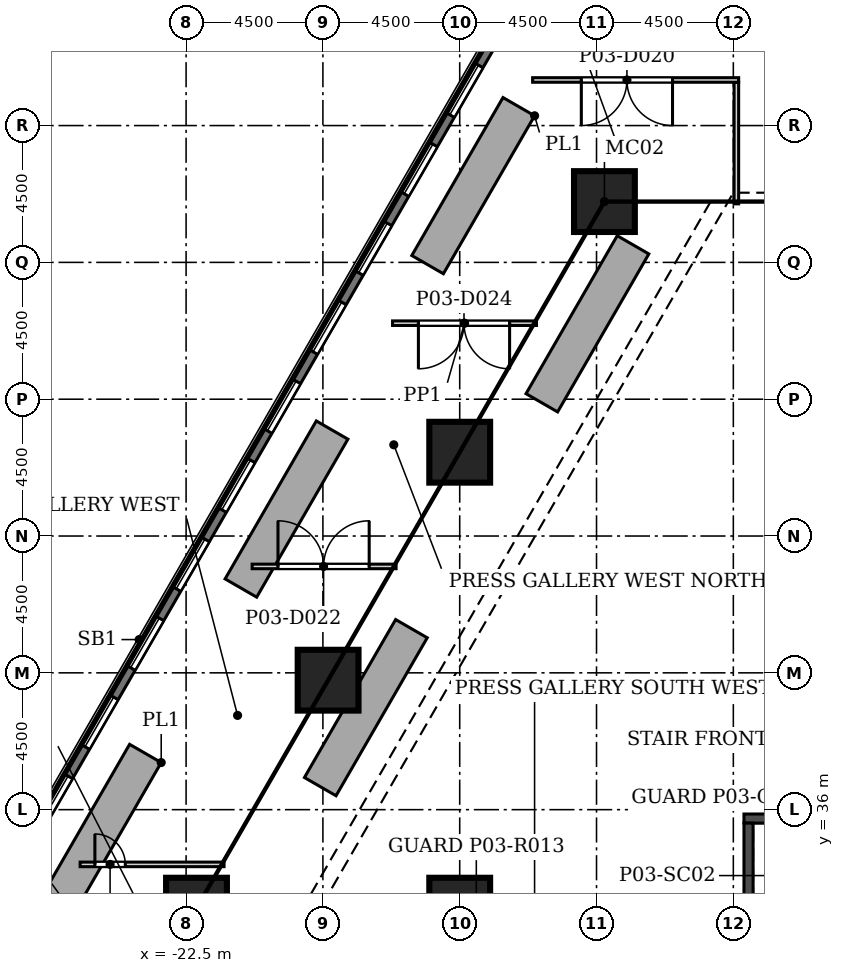
"""IFC4 building model, lengths in metres.
Left out: names, types, materials, properties, quantities, classifications, styles, units other than length and angle.
Written with IfcOpenShell. Run it as: python <this file> out.ifc"""

import sys

from ifc_helpers import new_model, si_unit, direction, frame, frame_2d, origin, origin_2d, place, context, subcontext, project, spatial, polyline, rectangle, outline, extrude, element, fill, save


model = new_model("IFC4")
c1 = context("Model", 3, precision=1e-05, world=origin(), true_north=direction((0.0, 1.0)))
c2 = subcontext(c1, "Body", "Model", "MODEL_VIEW")
j1 = project(units=[si_unit("LENGTHUNIT", "METRE"), si_unit("PLANEANGLEUNIT", "RADIAN")], contexts=[c1])
p1 = place(None, origin())
s1 = spatial("IfcSite", under=j1, at=p1, CompositionType="ELEMENT")
p2 = place(p1, origin())
s2 = spatial("IfcBuilding", under=s1, at=p2, CompositionType="ELEMENT")
p3 = place(p2, frame((0.0, 0.0, 20.0)))
s3 = spatial("IfcBuildingStorey", under=s2, at=p3, CompositionType="ELEMENT", Elevation=20.0)
for number, where, z_axis, x_axis in (
    (1, (-8.74, 56.0, 0.0), (0.0, 0.0, 1.0), (1.0, 0.0, 0.0)),
    (2, (-22.158, 32.76, 0.0), (0.0, 0.0, 1.0), (1.0, 0.0, 0.0)),
    (3, (-13.5, 47.756, 0.0), (0.0, 0.0, 1.0), (1.0, 0.0, 0.0)),
    (4, (-13.5, 32.76, 0.0), (0.0, 0.0, 1.0), (1.0, 0.0, 0.0)),
    (5, (-17.829, 40.258, 0.0), (0.0, 0.0, 1.0), (1.0, 0.0, 0.0)),
):
    element("IfcColumn", number, at=place(p3, frame(where, z_axis=z_axis, x_axis=x_axis)), inside=s3, PredefinedType="COLUMN", context=c2, shape_type="SweptSolid", body=[
        extrude(rectangle(XDim=2.0, YDim=2.0, at=origin_2d()), origin(), (0.0, 0.0, 1.0), 5.0),
    ])
p4 = place(p3, frame((-4.853, 74.393, 0.0), z_axis=(0.0, 0.0, 1.0), x_axis=(-0.49999894854, -0.866026010844, 0.0)))
e6 = element("IfcWall", 6, at=p4, inside=s3, PredefinedType="SOLIDWALL", context=c2, shape_type="SweptSolid", body=[
    extrude(rectangle(XDim=76.0, YDim=0.34, at=frame_2d((38.0, 0.0))), origin(), (0.0, 0.0, 1.0), 3.0),
])
p5 = place(p4, frame((1.058, 0.0, 0.9)))
e7 = element("IfcOpeningElement", 7, at=p5, cuts=e6, PredefinedType="OPENING", context=c2, shape_type="SweptSolid", body=[
    extrude(rectangle(XDim=1.885, YDim=1.9, at=frame_2d((0.942, 0.95))), frame((0.0, 0.18, 0.0), z_axis=(0.0, -1.0, 0.0), x_axis=(1.0, 0.0, 0.0)), (0.0, 0.0, 1.0), 0.36),
])
p6 = place(p4, frame((4.058, 0.0, 0.9)))
e8 = element("IfcOpeningElement", 8, at=p6, cuts=e6, PredefinedType="OPENING", context=c2, shape_type="SweptSolid", body=[
    extrude(rectangle(XDim=1.885, YDim=1.9, at=frame_2d((0.942, 0.95))), frame((0.0, 0.18, 0.0), z_axis=(0.0, -1.0, 0.0), x_axis=(1.0, 0.0, 0.0)), (0.0, 0.0, 1.0), 0.36),
])
p7 = place(p4, frame((7.058, 0.0, 0.9)))
e9 = element("IfcOpeningElement", 9, at=p7, cuts=e6, PredefinedType="OPENING", context=c2, shape_type="SweptSolid", body=[
    extrude(rectangle(XDim=1.885, YDim=1.9, at=frame_2d((0.942, 0.95))), frame((0.0, 0.18, 0.0), z_axis=(0.0, -1.0, 0.0), x_axis=(1.0, 0.0, 0.0)), (0.0, 0.0, 1.0), 0.36),
])
p8 = place(p4, frame((10.058, 0.0, 0.9)))
e10 = element("IfcOpeningElement", 10, at=p8, cuts=e6, PredefinedType="OPENING", context=c2, shape_type="SweptSolid", body=[
    extrude(rectangle(XDim=1.885, YDim=1.9, at=frame_2d((0.942, 0.95))), frame((0.0, 0.18, 0.0), z_axis=(0.0, -1.0, 0.0), x_axis=(1.0, 0.0, 0.0)), (0.0, 0.0, 1.0), 0.36),
])
p9 = place(p4, frame((13.058, 0.0, 0.9)))
e11 = element("IfcOpeningElement", 11, at=p9, cuts=e6, PredefinedType="OPENING", context=c2, shape_type="SweptSolid", body=[
    extrude(rectangle(XDim=1.885, YDim=1.9, at=frame_2d((0.942, 0.95))), frame((0.0, 0.18, 0.0), z_axis=(0.0, -1.0, 0.0), x_axis=(1.0, 0.0, 0.0)), (0.0, 0.0, 1.0), 0.36),
])
p10 = place(p4, frame((16.058, 0.0, 0.9)))
e12 = element("IfcOpeningElement", 12, at=p10, cuts=e6, PredefinedType="OPENING", context=c2, shape_type="SweptSolid", body=[
    extrude(rectangle(XDim=1.885, YDim=1.9, at=frame_2d((0.942, 0.95))), frame((0.0, 0.18, 0.0), z_axis=(0.0, -1.0, 0.0), x_axis=(1.0, 0.0, 0.0)), (0.0, 0.0, 1.0), 0.36),
])
p11 = place(p4, frame((19.058, 0.0, 0.9)))
e13 = element("IfcOpeningElement", 13, at=p11, cuts=e6, PredefinedType="OPENING", context=c2, shape_type="SweptSolid", body=[
    extrude(rectangle(XDim=1.885, YDim=1.9, at=frame_2d((0.942, 0.95))), frame((0.0, 0.18, 0.0), z_axis=(0.0, -1.0, 0.0), x_axis=(1.0, 0.0, 0.0)), (0.0, 0.0, 1.0), 0.36),
])
p12 = place(p4, frame((22.058, 0.0, 0.9)))
e14 = element("IfcOpeningElement", 14, at=p12, cuts=e6, PredefinedType="OPENING", context=c2, shape_type="SweptSolid", body=[
    extrude(rectangle(XDim=1.885, YDim=1.9, at=frame_2d((0.942, 0.95))), frame((0.0, 0.18, 0.0), z_axis=(0.0, -1.0, 0.0), x_axis=(1.0, 0.0, 0.0)), (0.0, 0.0, 1.0), 0.36),
])
p13 = place(p4, frame((25.058, 0.0, 0.9)))
e15 = element("IfcOpeningElement", 15, at=p13, cuts=e6, PredefinedType="OPENING", context=c2, shape_type="SweptSolid", body=[
    extrude(rectangle(XDim=1.885, YDim=1.9, at=frame_2d((0.942, 0.95))), frame((0.0, 0.18, 0.0), z_axis=(0.0, -1.0, 0.0), x_axis=(1.0, 0.0, 0.0)), (0.0, 0.0, 1.0), 0.36),
])
p14 = place(p4, frame((28.058, 0.0, 0.9)))
e16 = element("IfcOpeningElement", 16, at=p14, cuts=e6, PredefinedType="OPENING", context=c2, shape_type="SweptSolid", body=[
    extrude(rectangle(XDim=1.885, YDim=1.9, at=frame_2d((0.942, 0.95))), frame((0.0, 0.18, 0.0), z_axis=(0.0, -1.0, 0.0), x_axis=(1.0, 0.0, 0.0)), (0.0, 0.0, 1.0), 0.36),
])
p15 = place(p4, frame((31.058, 0.0, 0.9)))
e17 = element("IfcOpeningElement", 17, at=p15, cuts=e6, PredefinedType="OPENING", context=c2, shape_type="SweptSolid", body=[
    extrude(rectangle(XDim=1.885, YDim=1.9, at=frame_2d((0.942, 0.95))), frame((0.0, 0.18, 0.0), z_axis=(0.0, -1.0, 0.0), x_axis=(1.0, 0.0, 0.0)), (0.0, 0.0, 1.0), 0.36),
])
p16 = place(p4, frame((34.058, 0.0, 0.9)))
e18 = element("IfcOpeningElement", 18, at=p16, cuts=e6, PredefinedType="OPENING", context=c2, shape_type="SweptSolid", body=[
    extrude(rectangle(XDim=1.885, YDim=1.9, at=frame_2d((0.942, 0.95))), frame((0.0, 0.18, 0.0), z_axis=(0.0, -1.0, 0.0), x_axis=(1.0, 0.0, 0.0)), (0.0, 0.0, 1.0), 0.36),
])
p17 = place(p4, frame((37.058, 0.0, 0.9)))
e19 = element("IfcOpeningElement", 19, at=p17, cuts=e6, PredefinedType="OPENING", context=c2, shape_type="SweptSolid", body=[
    extrude(rectangle(XDim=1.885, YDim=1.9, at=frame_2d((0.942, 0.95))), frame((0.0, 0.18, 0.0), z_axis=(0.0, -1.0, 0.0), x_axis=(1.0, 0.0, 0.0)), (0.0, 0.0, 1.0), 0.36),
])
p18 = place(p4, frame((40.058, 0.0, 0.9)))
e20 = element("IfcOpeningElement", 20, at=p18, cuts=e6, PredefinedType="OPENING", context=c2, shape_type="SweptSolid", body=[
    extrude(rectangle(XDim=1.885, YDim=1.9, at=frame_2d((0.942, 0.95))), frame((0.0, 0.18, 0.0), z_axis=(0.0, -1.0, 0.0), x_axis=(1.0, 0.0, 0.0)), (0.0, 0.0, 1.0), 0.36),
])
p19 = place(p4, frame((43.058, 0.0, 0.9)))
e21 = element("IfcOpeningElement", 21, at=p19, cuts=e6, PredefinedType="OPENING", context=c2, shape_type="SweptSolid", body=[
    extrude(rectangle(XDim=1.885, YDim=1.9, at=frame_2d((0.942, 0.95))), frame((0.0, 0.18, 0.0), z_axis=(0.0, -1.0, 0.0), x_axis=(1.0, 0.0, 0.0)), (0.0, 0.0, 1.0), 0.36),
])
p20 = place(p4, frame((46.058, 0.0, 0.9)))
e22 = element("IfcOpeningElement", 22, at=p20, cuts=e6, PredefinedType="OPENING", context=c2, shape_type="SweptSolid", body=[
    extrude(rectangle(XDim=1.885, YDim=1.9, at=frame_2d((0.942, 0.95))), frame((0.0, 0.18, 0.0), z_axis=(0.0, -1.0, 0.0), x_axis=(1.0, 0.0, 0.0)), (0.0, 0.0, 1.0), 0.36),
])
p21 = place(p4, frame((49.058, 0.0, 0.9)))
e23 = element("IfcOpeningElement", 23, at=p21, cuts=e6, PredefinedType="OPENING", context=c2, shape_type="SweptSolid", body=[
    extrude(rectangle(XDim=1.885, YDim=1.9, at=frame_2d((0.942, 0.95))), frame((0.0, 0.18, 0.0), z_axis=(0.0, -1.0, 0.0), x_axis=(1.0, 0.0, 0.0)), (0.0, 0.0, 1.0), 0.36),
])
p22 = place(p4, frame((52.058, 0.0, 0.9)))
e24 = element("IfcOpeningElement", 24, at=p22, cuts=e6, PredefinedType="OPENING", context=c2, shape_type="SweptSolid", body=[
    extrude(rectangle(XDim=1.885, YDim=1.9, at=frame_2d((0.942, 0.95))), frame((0.0, 0.18, 0.0), z_axis=(0.0, -1.0, 0.0), x_axis=(1.0, 0.0, 0.0)), (0.0, 0.0, 1.0), 0.36),
])
p23 = place(p4, frame((55.058, 0.0, 0.9)))
e25 = element("IfcOpeningElement", 25, at=p23, cuts=e6, PredefinedType="OPENING", context=c2, shape_type="SweptSolid", body=[
    extrude(rectangle(XDim=1.885, YDim=1.9, at=frame_2d((0.942, 0.95))), frame((0.0, 0.18, 0.0), z_axis=(0.0, -1.0, 0.0), x_axis=(1.0, 0.0, 0.0)), (0.0, 0.0, 1.0), 0.36),
])
p24 = place(p4, frame((58.058, 0.0, 0.9)))
e26 = element("IfcOpeningElement", 26, at=p24, cuts=e6, PredefinedType="OPENING", context=c2, shape_type="SweptSolid", body=[
    extrude(rectangle(XDim=1.885, YDim=1.9, at=frame_2d((0.942, 0.95))), frame((0.0, 0.18, 0.0), z_axis=(0.0, -1.0, 0.0), x_axis=(1.0, 0.0, 0.0)), (0.0, 0.0, 1.0), 0.36),
])
p25 = place(p4, frame((61.058, 0.0, 0.9)))
e27 = element("IfcOpeningElement", 27, at=p25, cuts=e6, PredefinedType="OPENING", context=c2, shape_type="SweptSolid", body=[
    extrude(rectangle(XDim=1.885, YDim=1.9, at=frame_2d((0.942, 0.95))), frame((0.0, 0.18, 0.0), z_axis=(0.0, -1.0, 0.0), x_axis=(1.0, 0.0, 0.0)), (0.0, 0.0, 1.0), 0.36),
])
p26 = place(p4, frame((64.058, 0.0, 0.9)))
e28 = element("IfcOpeningElement", 28, at=p26, cuts=e6, PredefinedType="OPENING", context=c2, shape_type="SweptSolid", body=[
    extrude(rectangle(XDim=1.885, YDim=1.9, at=frame_2d((0.942, 0.95))), frame((0.0, 0.18, 0.0), z_axis=(0.0, -1.0, 0.0), x_axis=(1.0, 0.0, 0.0)), (0.0, 0.0, 1.0), 0.36),
])
p27 = place(p4, frame((67.058, 0.0, 0.9)))
e29 = element("IfcOpeningElement", 29, at=p27, cuts=e6, PredefinedType="OPENING", context=c2, shape_type="SweptSolid", body=[
    extrude(rectangle(XDim=1.885, YDim=1.9, at=frame_2d((0.942, 0.95))), frame((0.0, 0.18, 0.0), z_axis=(0.0, -1.0, 0.0), x_axis=(1.0, 0.0, 0.0)), (0.0, 0.0, 1.0), 0.36),
])
p28 = place(p4, frame((70.058, 0.0, 0.9)))
e30 = element("IfcOpeningElement", 30, at=p28, cuts=e6, PredefinedType="OPENING", context=c2, shape_type="SweptSolid", body=[
    extrude(rectangle(XDim=1.885, YDim=1.9, at=frame_2d((0.942, 0.95))), frame((0.0, 0.18, 0.0), z_axis=(0.0, -1.0, 0.0), x_axis=(1.0, 0.0, 0.0)), (0.0, 0.0, 1.0), 0.36),
])
p29 = place(p4, frame((73.058, 0.0, 0.9)))
e31 = element("IfcOpeningElement", 31, at=p29, cuts=e6, PredefinedType="OPENING", context=c2, shape_type="SweptSolid", body=[
    extrude(rectangle(XDim=1.885, YDim=1.9, at=frame_2d((0.942, 0.95))), frame((0.0, 0.18, 0.0), z_axis=(0.0, -1.0, 0.0), x_axis=(1.0, 0.0, 0.0)), (0.0, 0.0, 1.0), 0.36),
])
p30 = place(p3, frame((0.0, 0.0, 5.0)))
e32 = element("IfcWall", 32, at=p30, inside=s3, PredefinedType="USERDEFINED", context=c2, shape_type="SweptSolid", body=[
    extrude(outline(polyline([(-27.358, 32.953), (-26.319, 32.353), (-23.319, 37.549), (-24.358, 38.149), (-27.358, 32.953)])), origin(), (0.0, 0.0, 1.0), 1.1),
])
p31 = place(p3, frame((0.0, 0.0, 5.0)))
e33 = element("IfcWall", 33, at=p31, inside=s3, PredefinedType="USERDEFINED", context=c2, shape_type="SweptSolid", body=[
    extrude(outline(polyline([(-21.217, 43.589), (-20.178, 42.989), (-17.178, 48.186), (-18.217, 48.785), (-21.217, 43.589)])), origin(), (0.0, 0.0, 1.0), 1.1),
])
p32 = place(p3, frame((0.0, 0.0, 5.0)))
e34 = element("IfcWall", 34, at=p32, inside=s3, PredefinedType="USERDEFINED", context=c2, shape_type="SweptSolid", body=[
    extrude(outline(polyline([(-15.076, 54.226), (-14.037, 53.625), (-11.037, 58.822), (-12.076, 59.422), (-15.076, 54.226)])), origin(), (0.0, 0.0, 1.0), 1.1),
])
p33 = place(p3, frame((0.0, 0.0, 5.0)))
e35 = element("IfcWall", 35, at=p33, inside=s3, PredefinedType="USERDEFINED", context=c2, shape_type="SweptSolid", body=[
    extrude(outline(polyline([(-7.279, 54.278), (-8.319, 54.877), (-11.319, 49.681), (-10.279, 49.081), (-7.279, 54.278)])), origin(), (0.0, 0.0, 1.0), 1.1),
])
p34 = place(p3, frame((0.0, 0.0, 5.0)))
e36 = element("IfcWall", 36, at=p34, inside=s3, PredefinedType="USERDEFINED", context=c2, shape_type="SweptSolid", body=[
    extrude(outline(polyline([(-14.568, 41.653), (-15.607, 42.253), (-18.607, 37.057), (-17.568, 36.457), (-14.568, 41.653)])), origin(), (0.0, 0.0, 1.0), 1.1),
])
p35 = place(p3, frame((-4.15, 35.707, -0.3), z_axis=(0.0, 0.0, 1.0), x_axis=(1.0, 0.0, 0.0)))
e37 = element("IfcWall", 37, at=p35, inside=s3, PredefinedType="SOLIDWALL", context=c2, shape_type="SweptSolid", body=[
    extrude(rectangle(XDim=8.3, YDim=0.3, at=frame_2d((4.15, 0.0))), origin(), (0.0, 0.0, 1.0), 3.3),
])
p36 = place(p3, frame((-4.0, 29.057, -0.3), z_axis=(0.0, 0.0, 1.0), x_axis=(0.0, 1.0, 0.0)))
e38 = element("IfcWall", 38, at=p36, inside=s3, PredefinedType="SOLIDWALL", context=c2, shape_type="SweptSolid", body=[
    extrude(rectangle(XDim=6.5, YDim=0.3, at=frame_2d((3.25, 0.0))), origin(), (0.0, 0.0, 1.0), 3.3),
])
p37 = place(p3, frame((-25.986, 34.2, 0.0), z_axis=(0.0, 0.0, 1.0), x_axis=(1.0, 0.0, 0.0)))
e39 = element("IfcWall", 39, at=p37, inside=s3, PredefinedType="PARTITIONING", context=c2, shape_type="SweptSolid", body=[
    extrude(rectangle(XDim=4.734, YDim=0.15, at=frame_2d((2.367, 0.0))), origin(), (0.0, 0.0, 1.0), 3.0),
])
p38 = place(p37, frame((0.486, 0.0, 0.0)))
e40 = element("IfcOpeningElement", 40, at=p38, cuts=e39, PredefinedType="OPENING", context=c2, shape_type="SweptSolid", body=[
    extrude(rectangle(XDim=1.0, YDim=2.1, at=frame_2d((0.5, 1.05))), frame((0.0, 0.085, 0.0), z_axis=(0.0, -1.0, 0.0), x_axis=(1.0, 0.0, 0.0)), (0.0, 0.0, 1.0), 0.17),
])
p39 = place(p3, frame((-20.327, 44.0, 0.0), z_axis=(0.0, 0.0, 1.0), x_axis=(1.0, 0.0, 0.0)))
e41 = element("IfcWall", 41, at=p39, inside=s3, PredefinedType="PARTITIONING", context=c2, shape_type="SweptSolid", body=[
    extrude(rectangle(XDim=4.734, YDim=0.15, at=frame_2d((2.367, 0.0))), origin(), (0.0, 0.0, 1.0), 3.0),
])
p40 = place(p39, frame((0.85, 0.0, 0.0)))
e42 = element("IfcOpeningElement", 42, at=p40, cuts=e41, PredefinedType="OPENING", context=c2, shape_type="SweptSolid", body=[
    extrude(rectangle(XDim=3.0, YDim=2.4, at=frame_2d((1.5, 1.2))), frame((0.0, 0.085, 0.0), z_axis=(0.0, -1.0, 0.0), x_axis=(1.0, 0.0, 0.0)), (0.0, 0.0, 1.0), 0.17),
])
p41 = place(p3, frame((-15.709, 52.0, 0.0), z_axis=(0.0, 0.0, 1.0), x_axis=(1.0, 0.0, 0.0)))
e43 = element("IfcWall", 43, at=p41, inside=s3, PredefinedType="PARTITIONING", context=c2, shape_type="SweptSolid", body=[
    extrude(rectangle(XDim=4.734, YDim=0.15, at=frame_2d((2.367, 0.0))), origin(), (0.0, 0.0, 1.0), 3.0),
])
p42 = place(p41, frame((0.85, 0.0, 0.0)))
e44 = element("IfcOpeningElement", 44, at=p42, cuts=e43, PredefinedType="OPENING", context=c2, shape_type="SweptSolid", body=[
    extrude(rectangle(XDim=3.0, YDim=2.4, at=frame_2d((1.5, 1.2))), frame((0.0, 0.085, 0.0), z_axis=(0.0, -1.0, 0.0), x_axis=(1.0, 0.0, 0.0)), (0.0, 0.0, 1.0), 0.17),
])
p43 = place(p3, frame((-4.4, 59.925, 0.0), z_axis=(0.0, 0.0, 1.0), x_axis=(0.0, -1.0, 0.0)))
e45 = element("IfcWall", 45, at=p43, inside=s3, PredefinedType="PARTITIONING", context=c2, shape_type="SweptSolid", body=[
    extrude(rectangle(XDim=4.0, YDim=0.15, at=frame_2d((2.0, 0.0))), origin(), (0.0, 0.0, 1.0), 3.0),
])
p44 = place(p3, frame((-11.102, 60.0, 0.0), z_axis=(0.0, 0.0, 1.0), x_axis=(1.0, 0.0, 0.0)))
e46 = element("IfcWall", 46, at=p44, inside=s3, PredefinedType="PARTITIONING", context=c2, shape_type="SweptSolid", body=[
    extrude(rectangle(XDim=6.777, YDim=0.15, at=frame_2d((3.389, 0.0))), origin(), (0.0, 0.0, 1.0), 3.0),
])
p45 = place(p44, frame((1.602, 0.0, 0.0)))
e47 = element("IfcOpeningElement", 47, at=p45, cuts=e46, PredefinedType="OPENING", context=c2, shape_type="SweptSolid", body=[
    extrude(rectangle(XDim=3.0, YDim=2.4, at=frame_2d((1.5, 1.2))), frame((0.0, 0.085, 0.0), z_axis=(0.0, -1.0, 0.0), x_axis=(1.0, 0.0, 0.0)), (0.0, 0.0, 1.0), 0.17),
])
p46 = place(p10, origin())
e48 = element("IfcWindow", 48, at=p46, inside=s3, PartitioningType="SINGLE_PANEL", PredefinedType="WINDOW", context=c2, shape_type="SweptSolid", body=[
    extrude(rectangle(XDim=1.885, YDim=1.9, at=frame_2d((0.942, 0.95))), frame((0.0, 0.11, 0.0), z_axis=(0.0, -1.0, 0.0), x_axis=(1.0, 0.0, 0.0)), (0.0, 0.0, 1.0), 0.06),
])
fill(e12, e48)
p47 = place(p11, origin())
e49 = element("IfcWindow", 49, at=p47, inside=s3, PartitioningType="SINGLE_PANEL", PredefinedType="WINDOW", context=c2, shape_type="SweptSolid", body=[
    extrude(rectangle(XDim=1.885, YDim=1.9, at=frame_2d((0.942, 0.95))), frame((0.0, 0.11, 0.0), z_axis=(0.0, -1.0, 0.0), x_axis=(1.0, 0.0, 0.0)), (0.0, 0.0, 1.0), 0.06),
])
fill(e13, e49)
p48 = place(p12, origin())
e50 = element("IfcWindow", 50, at=p48, inside=s3, PartitioningType="SINGLE_PANEL", PredefinedType="WINDOW", context=c2, shape_type="SweptSolid", body=[
    extrude(rectangle(XDim=1.885, YDim=1.9, at=frame_2d((0.942, 0.95))), frame((0.0, 0.11, 0.0), z_axis=(0.0, -1.0, 0.0), x_axis=(1.0, 0.0, 0.0)), (0.0, 0.0, 1.0), 0.06),
])
fill(e14, e50)
p49 = place(p13, origin())
e51 = element("IfcWindow", 51, at=p49, inside=s3, PartitioningType="SINGLE_PANEL", PredefinedType="WINDOW", context=c2, shape_type="SweptSolid", body=[
    extrude(rectangle(XDim=1.885, YDim=1.9, at=frame_2d((0.942, 0.95))), frame((0.0, 0.11, 0.0), z_axis=(0.0, -1.0, 0.0), x_axis=(1.0, 0.0, 0.0)), (0.0, 0.0, 1.0), 0.06),
])
fill(e15, e51)
p50 = place(p14, origin())
e52 = element("IfcWindow", 52, at=p50, inside=s3, PartitioningType="SINGLE_PANEL", PredefinedType="WINDOW", context=c2, shape_type="SweptSolid", body=[
    extrude(rectangle(XDim=1.885, YDim=1.9, at=frame_2d((0.942, 0.95))), frame((0.0, 0.11, 0.0), z_axis=(0.0, -1.0, 0.0), x_axis=(1.0, 0.0, 0.0)), (0.0, 0.0, 1.0), 0.06),
])
fill(e16, e52)
p51 = place(p15, origin())
e53 = element("IfcWindow", 53, at=p51, inside=s3, PartitioningType="SINGLE_PANEL", PredefinedType="WINDOW", context=c2, shape_type="SweptSolid", body=[
    extrude(rectangle(XDim=1.885, YDim=1.9, at=frame_2d((0.942, 0.95))), frame((0.0, 0.11, 0.0), z_axis=(0.0, -1.0, 0.0), x_axis=(1.0, 0.0, 0.0)), (0.0, 0.0, 1.0), 0.06),
])
fill(e17, e53)
p52 = place(p16, origin())
e54 = element("IfcWindow", 54, at=p52, inside=s3, PartitioningType="SINGLE_PANEL", PredefinedType="WINDOW", context=c2, shape_type="SweptSolid", body=[
    extrude(rectangle(XDim=1.885, YDim=1.9, at=frame_2d((0.942, 0.95))), frame((0.0, 0.11, 0.0), z_axis=(0.0, -1.0, 0.0), x_axis=(1.0, 0.0, 0.0)), (0.0, 0.0, 1.0), 0.06),
])
fill(e18, e54)
p53 = place(p17, origin())
e55 = element("IfcWindow", 55, at=p53, inside=s3, PartitioningType="SINGLE_PANEL", PredefinedType="WINDOW", context=c2, shape_type="SweptSolid", body=[
    extrude(rectangle(XDim=1.885, YDim=1.9, at=frame_2d((0.942, 0.95))), frame((0.0, 0.11, 0.0), z_axis=(0.0, -1.0, 0.0), x_axis=(1.0, 0.0, 0.0)), (0.0, 0.0, 1.0), 0.06),
])
fill(e19, e55)
p54 = place(p18, origin())
e56 = element("IfcWindow", 56, at=p54, inside=s3, PartitioningType="SINGLE_PANEL", PredefinedType="WINDOW", context=c2, shape_type="SweptSolid", body=[
    extrude(rectangle(XDim=1.885, YDim=1.9, at=frame_2d((0.942, 0.95))), frame((0.0, 0.11, 0.0), z_axis=(0.0, -1.0, 0.0), x_axis=(1.0, 0.0, 0.0)), (0.0, 0.0, 1.0), 0.06),
])
fill(e20, e56)
p55 = place(p19, origin())
e57 = element("IfcWindow", 57, at=p55, inside=s3, PartitioningType="SINGLE_PANEL", PredefinedType="WINDOW", context=c2, shape_type="SweptSolid", body=[
    extrude(rectangle(XDim=1.885, YDim=1.9, at=frame_2d((0.942, 0.95))), frame((0.0, 0.11, 0.0), z_axis=(0.0, -1.0, 0.0), x_axis=(1.0, 0.0, 0.0)), (0.0, 0.0, 1.0), 0.06),
])
fill(e21, e57)
p56 = place(p45, frame((3.0, 0.0, 0.0), z_axis=(0.0, 0.0, 1.0), x_axis=(-1.0, 0.0, 0.0)))
e58 = element("IfcDoor", 58, at=p56, inside=s3, OperationType="DOUBLE_DOOR_SINGLE_SWING", PredefinedType="DOOR", context=c2, shape_type="SweptSolid", body=[
    extrude(rectangle(XDim=3.0, YDim=2.4, at=frame_2d((1.5, 1.2))), frame((0.0, 0.025, 0.0), z_axis=(0.0, -1.0, 0.0), x_axis=(1.0, 0.0, 0.0)), (0.0, 0.0, 1.0), 0.05),
])
fill(e47, e58)
p57 = place(p40, origin())
e59 = element("IfcDoor", 59, at=p57, inside=s3, OperationType="DOUBLE_DOOR_SINGLE_SWING", PredefinedType="DOOR", context=c2, shape_type="SweptSolid", body=[
    extrude(rectangle(XDim=3.0, YDim=2.4, at=frame_2d((1.5, 1.2))), frame((0.0, 0.025, 0.0), z_axis=(0.0, -1.0, 0.0), x_axis=(1.0, 0.0, 0.0)), (0.0, 0.0, 1.0), 0.05),
])
fill(e42, e59)
p58 = place(p42, frame((3.0, 0.0, 0.0), z_axis=(0.0, 0.0, 1.0), x_axis=(-1.0, 0.0, 0.0)))
e60 = element("IfcDoor", 60, at=p58, inside=s3, OperationType="DOUBLE_DOOR_SINGLE_SWING", PredefinedType="DOOR", context=c2, shape_type="SweptSolid", body=[
    extrude(rectangle(XDim=3.0, YDim=2.4, at=frame_2d((1.5, 1.2))), frame((0.0, 0.025, 0.0), z_axis=(0.0, -1.0, 0.0), x_axis=(1.0, 0.0, 0.0)), (0.0, 0.0, 1.0), 0.05),
])
fill(e44, e60)
p59 = place(p38, origin())
e61 = element("IfcDoor", 61, at=p59, inside=s3, OperationType="SINGLE_SWING_LEFT", PredefinedType="DOOR", context=c2, shape_type="SweptSolid", body=[
    extrude(rectangle(XDim=1.0, YDim=2.1, at=frame_2d((0.5, 1.05))), frame((0.0, 0.025, 0.0), z_axis=(0.0, -1.0, 0.0), x_axis=(1.0, 0.0, 0.0)), (0.0, 0.0, 1.0), 0.05),
])
fill(e40, e61)
save(model, sys.argv[1])
